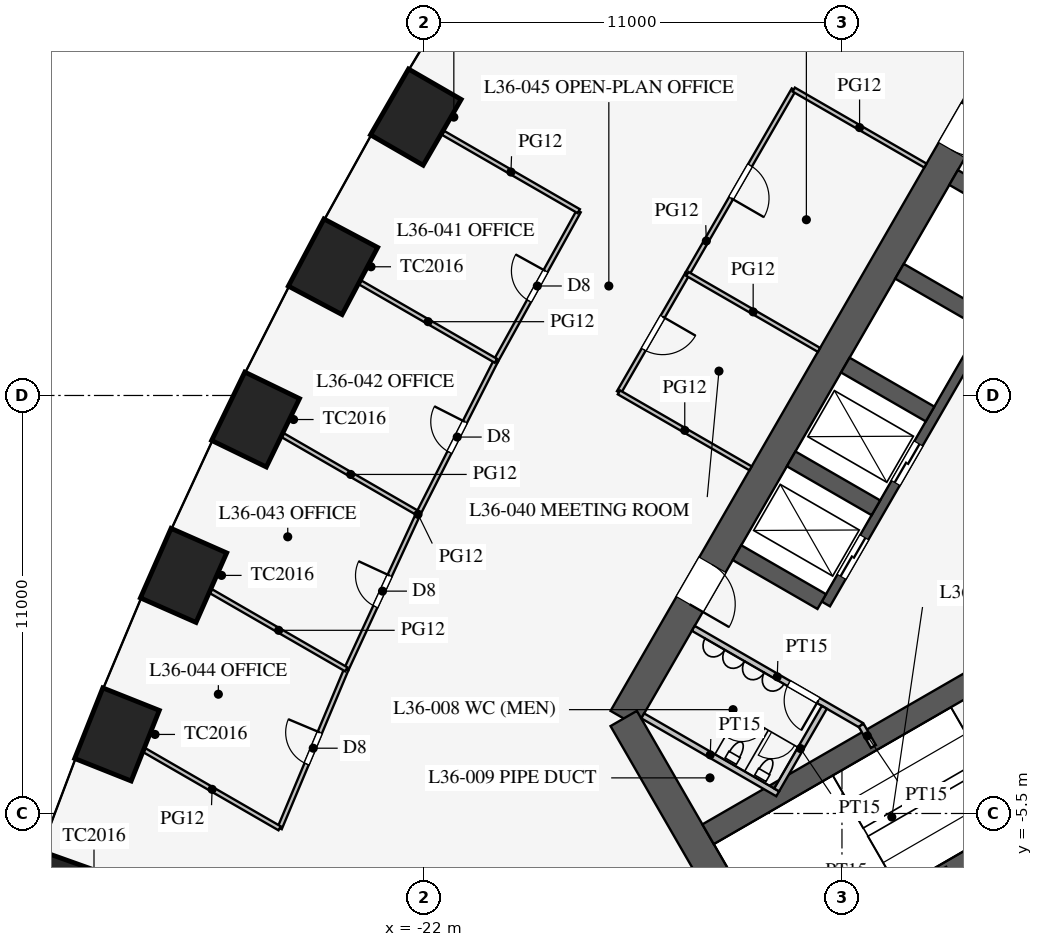
"""IFC4 building model, lengths in metres.
Left out: names, types, materials, properties, quantities, classifications, styles, units other than length and angle.
Written with IfcOpenShell. Run it as: python <this file> out.ifc"""

import sys

from ifc_helpers import new_model, si_unit, direction, frame, frame_2d, origin, origin_2d, place, context, subcontext, project, spatial, rectangle, extrude, element, fill, save


model = new_model("IFC4")
c1 = context("Model", 3, precision=1e-05, world=origin(), true_north=direction((0.0, 1.0)))
c2 = subcontext(c1, "Body", "Model", "MODEL_VIEW")
j1 = project(units=[si_unit("LENGTHUNIT", "METRE"), si_unit("PLANEANGLEUNIT", "RADIAN")], contexts=[c1])
p1 = place(None, origin())
s1 = spatial("IfcSite", under=j1, at=p1, CompositionType="ELEMENT")
p2 = place(p1, origin())
s2 = spatial("IfcBuilding", under=s1, at=p2, CompositionType="ELEMENT")
p3 = place(p2, frame((0.0, 0.0, 157.7)))
s3 = spatial("IfcBuildingStorey", under=s2, at=p3, CompositionType="ELEMENT", Elevation=157.7)
for number, where, z_axis, x_axis in (
    (1, (-22.213, 12.825, 0.0), (0.0, 0.0, 1.0), (-0.5, -0.866, 0.0)),
    (2, (-24.393, 8.887, 0.0), (0.0, 0.0, 1.0), (-0.468, -0.883, 0.0)),
    (3, (-26.43, 4.867, 0.0), (0.0, 0.0, 1.0), (-0.436, -0.9, 0.0)),
    (4, (-28.325, 0.765, 0.0), (0.0, 0.0, 1.0), (-0.403, -0.915, 0.0)),
    (5, (-30.077, -3.42, 0.0), (0.0, 0.0, 1.0), (-0.37, -0.929, 0.0)),
    (6, (-31.682, -7.689, 0.0), (0.0, 0.0, 1.0), (-0.336, -0.942, 0.0)),
):
    element("IfcColumn", number, at=place(p3, frame(where, z_axis=z_axis, x_axis=x_axis)), inside=s3, PredefinedType="COLUMN", context=c2, shape_type="SweptSolid", body=[
        extrude(rectangle(XDim=2.0, YDim=1.6, at=origin_2d()), origin(), (0.0, 0.0, 1.0), 4.2),
    ])
p4 = place(p3, frame((-5.773, 16.0, 0.0), z_axis=(0.0, 0.0, 1.0), x_axis=(-0.500002442456, -0.866023993627, 0.0)))
e7 = element("IfcWall", 7, at=p4, inside=s3, PredefinedType="SHEAR", context=c2, shape_type="SweptSolid", body=[
    extrude(rectangle(XDim=21.939, YDim=0.8, at=frame_2d((10.97, 0.0))), origin(), (0.0, 0.0, 1.0), 4.2),
])
p5 = place(p4, frame((17.27, 0.0, 0.0)))
e8 = element("IfcOpeningElement", 8, at=p5, cuts=e7, PredefinedType="OPENING", context=c2, shape_type="SweptSolid", body=[
    extrude(rectangle(XDim=1.2, YDim=2.1, at=frame_2d((0.6, 1.05))), frame((0.0, 0.41, 0.0), z_axis=(0.0, -1.0, 0.0), x_axis=(1.0, 0.0, 0.0)), (0.0, 0.0, 1.0), 0.82),
])
p6 = place(p4, frame((3.47, 0.0, 0.0)))
e9 = element("IfcOpeningElement", 9, at=p6, cuts=e7, PredefinedType="OPENING", context=c2, shape_type="SweptSolid", body=[
    extrude(rectangle(XDim=1.2, YDim=2.1, at=frame_2d((0.6, 1.05))), frame((0.0, 0.41, 0.0), z_axis=(0.0, -1.0, 0.0), x_axis=(1.0, 0.0, 0.0)), (0.0, 0.0, 1.0), 0.82),
])
p7 = place(p3, frame((-16.743, -3.0, 0.0), z_axis=(0.0, 0.0, 1.0), x_axis=(0.499995765644, -0.866027848477, 0.0)))
e10 = element("IfcWall", 10, at=p7, inside=s3, PredefinedType="SHEAR", context=c2, shape_type="SweptSolid", body=[
    extrude(rectangle(XDim=11.547, YDim=0.8, at=frame_2d((5.773, 0.0))), origin(), (0.0, 0.0, 1.0), 4.2),
])
p8 = place(p3, frame((-5.724, 9.886, 0.0), z_axis=(0.0, 0.0, 1.0), x_axis=(-0.500001763848, -0.866024385424, 0.0)))
e11 = element("IfcWall", 11, at=p8, inside=s3, PredefinedType="SHEAR", context=c2, shape_type="SweptSolid", body=[
    extrude(rectangle(XDim=11.4, YDim=0.25, at=frame_2d((5.7, 0.0))), origin(), (0.0, 0.0, 1.0), 4.2),
])
p9 = place(p8, frame((6.525, 0.0, 0.0)))
e12 = element("IfcOpeningElement", 12, at=p9, cuts=e11, PredefinedType="OPENING", context=c2, shape_type="SweptSolid", body=[
    extrude(rectangle(XDim=1.2, YDim=2.2, at=frame_2d((0.6, 1.1))), frame((0.0, 0.135, 0.0), z_axis=(0.0, -1.0, 0.0), x_axis=(1.0, 0.0, 0.0)), (0.0, 0.0, 1.0), 0.27),
])
p10 = place(p8, frame((9.375, 0.0, 0.0)))
e13 = element("IfcOpeningElement", 13, at=p10, cuts=e11, PredefinedType="OPENING", context=c2, shape_type="SweptSolid", body=[
    extrude(rectangle(XDim=1.2, YDim=2.2, at=frame_2d((0.6, 1.1))), frame((0.0, 0.135, 0.0), z_axis=(0.0, -1.0, 0.0), x_axis=(1.0, 0.0, 0.0)), (0.0, 0.0, 1.0), 0.27),
])
p11 = place(p3, frame((-5.832, 9.949, 0.0), z_axis=(0.0, 0.0, 1.0), x_axis=(-0.866029291668, 0.499993265928, 0.0)))
e14 = element("IfcWall", 14, at=p11, inside=s3, PredefinedType="SHEAR", context=c2, shape_type="SweptSolid", body=[
    extrude(rectangle(XDim=2.575, YDim=0.45, at=frame_2d((1.288, 0.0))), origin(), (0.0, 0.0, 1.0), 4.2),
])
for number, where, z_axis, x_axis in (
    (15, (-7.257, 7.481, 0.0), (0.0, 0.0, 1.0), (-0.866, 0.5, 0.0)),
    (16, (-8.682, 5.012, 0.0), (0.0, 0.0, 1.0), (-0.866, 0.5, 0.0)),
    (17, (-10.107, 2.544, 0.0), (0.0, 0.0, 1.0), (-0.866, 0.5, 0.0)),
    (18, (-11.532, 0.076, 0.0), (0.0, 0.0, 1.0), (-0.866, 0.5, 0.0)),
):
    element("IfcWall", number, at=place(p3, frame(where, z_axis=z_axis, x_axis=x_axis)), inside=s3, PredefinedType="SHEAR", context=c2, shape_type="SweptSolid", body=[
        extrude(rectangle(XDim=2.575, YDim=0.45, at=frame_2d((1.288, 0.0))), origin(), (0.0, 0.0, 1.0), 4.2),
    ])
for number, where, z_axis, x_axis in (
    (19, (-6.663, -1.509, 0.0), (0.0, 0.0, 1.0), (-0.866, -0.5, 0.0)),
    (20, (-4.638, -5.016, 0.0), (0.0, 0.0, 1.0), (-0.866, -0.5, 0.0)),
):
    element("IfcWall", number, at=place(p3, frame(where, z_axis=z_axis, x_axis=x_axis)), inside=s3, PredefinedType="SHEAR", context=c2, shape_type="SweptSolid", body=[
        extrude(rectangle(XDim=9.075, YDim=0.6, at=frame_2d((4.538, 0.0))), origin(), (0.0, 0.0, 1.0), 4.2),
    ])
p12 = place(p3, frame((-10.495, -3.178, 0.0), z_axis=(0.0, 0.0, 1.0), x_axis=(-0.86602216432, 0.500005610874, 0.0)))
e21 = element("IfcWall", 21, at=p12, inside=s3, PredefinedType="PARTITIONING", context=c2, shape_type="SweptSolid", body=[
    extrude(rectangle(XDim=5.1, YDim=0.15, at=frame_2d((2.55, 0.0))), origin(), (0.0, 0.0, 1.0), 4.0),
])
p13 = place(p12, frame((1.3, 0.0, 0.0)))
e22 = element("IfcOpeningElement", 22, at=p13, cuts=e21, PredefinedType="OPENING", context=c2, shape_type="SweptSolid", body=[
    extrude(rectangle(XDim=0.9, YDim=2.1, at=frame_2d((0.45, 1.05))), frame((0.0, 0.085, 0.0), z_axis=(0.0, -1.0, 0.0), x_axis=(1.0, 0.0, 0.0)), (0.0, 0.0, 1.0), 0.17),
])
p14 = place(p3, frame((-10.495, -3.178, 0.0), z_axis=(0.0, 0.0, 1.0), x_axis=(0.499842556608, -0.866116284689, 0.0)))
e23 = element("IfcWall", 23, at=p14, inside=s3, PredefinedType="PARTITIONING", context=c2, shape_type="SweptSolid", body=[
    extrude(rectangle(XDim=0.645, YDim=0.15, at=frame_2d((0.323, 0.0))), origin(), (0.0, 0.0, 1.0), 4.0),
])
p15 = place(p3, frame((-12.691, -4.982, 0.0), z_axis=(0.0, 0.0, 1.0), x_axis=(-0.8660249478, 0.500000789788, 0.0)))
e24 = element("IfcWall", 24, at=p15, inside=s3, PredefinedType="PARTITIONING", context=c2, shape_type="SweptSolid", body=[
    extrude(rectangle(XDim=4.1, YDim=0.15, at=frame_2d((2.05, 0.0))), origin(), (0.0, 0.0, 1.0), 4.0),
])
p16 = place(p3, frame((-11.464, -2.706, 0.0), z_axis=(0.0, 0.0, 1.0), x_axis=(-0.50001992892, -0.866013897511, 0.0)))
e25 = element("IfcWall", 25, at=p16, inside=s3, PredefinedType="PARTITIONING", context=c2, shape_type="SweptSolid", body=[
    extrude(rectangle(XDim=2.51, YDim=0.15, at=frame_2d((1.255, 0.0))), origin(), (0.0, 0.0, 1.0), 4.0),
])
p17 = place(p3, frame((-15.069, 8.7, 0.0), z_axis=(0.0, 0.0, 1.0), x_axis=(-0.500012057535, -0.866018442252, 0.0)))
e26 = element("IfcWall", 26, at=p17, inside=s3, PredefinedType="PARTITIONING", context=c2, shape_type="SweptSolid", body=[
    extrude(rectangle(XDim=3.6, YDim=0.12, at=frame_2d((1.8, 0.0))), origin(), (0.0, 0.0, 1.0), 2.9),
])
p18 = place(p17, frame((1.3, 0.0, 0.15)))
e27 = element("IfcOpeningElement", 27, at=p18, cuts=e26, PredefinedType="OPENING", context=c2, shape_type="SweptSolid", body=[
    extrude(rectangle(XDim=1.0, YDim=2.1, at=frame_2d((0.5, 1.05))), frame((0.0, 0.07, 0.0), z_axis=(0.0, -1.0, 0.0), x_axis=(1.0, 0.0, 0.0)), (0.0, 0.0, 1.0), 0.14),
])
p19 = place(p3, frame((-12.269, 13.55, 0.0), z_axis=(0.0, 0.0, 1.0), x_axis=(-0.49999793692, -0.866026594901, 0.0)))
e28 = element("IfcWall", 28, at=p19, inside=s3, PredefinedType="PARTITIONING", context=c2, shape_type="SweptSolid", body=[
    extrude(rectangle(XDim=5.6, YDim=0.12, at=frame_2d((2.8, 0.0))), origin(), (0.0, 0.0, 1.0), 2.9),
])
p20 = place(p19, frame((2.3, 0.0, 0.15)))
e29 = element("IfcOpeningElement", 29, at=p20, cuts=e28, PredefinedType="OPENING", context=c2, shape_type="SweptSolid", body=[
    extrude(rectangle(XDim=1.0, YDim=2.1, at=frame_2d((0.5, 1.05))), frame((0.0, 0.07, 0.0), z_axis=(0.0, -1.0, 0.0), x_axis=(1.0, 0.0, 0.0)), (0.0, 0.0, 1.0), 0.14),
])
p21 = place(p3, frame((-13.405, 3.582, 0.0), z_axis=(0.0, 0.0, 1.0), x_axis=(-0.866026010844, 0.49999894854, 0.0)))
e30 = element("IfcWall", 30, at=p21, inside=s3, PredefinedType="PARTITIONING", context=c2, shape_type="SweptSolid", body=[
    extrude(rectangle(XDim=4.0, YDim=0.12, at=frame_2d((2.0, 0.0))), origin(), (0.0, 0.0, 1.0), 2.9),
])
p22 = place(p3, frame((-11.605, 6.7, 0.0), z_axis=(0.0, 0.0, 1.0), x_axis=(-0.866026010844, 0.49999894854, 0.0)))
e31 = element("IfcWall", 31, at=p22, inside=s3, PredefinedType="PARTITIONING", context=c2, shape_type="SweptSolid", body=[
    extrude(rectangle(XDim=4.0, YDim=0.12, at=frame_2d((2.0, 0.0))), origin(), (0.0, 0.0, 1.0), 2.8),
])
p23 = place(p3, frame((-8.805, 11.55, 0.0), z_axis=(0.0, 0.0, 1.0), x_axis=(-0.866026010844, 0.49999894854, 0.0)))
e32 = element("IfcWall", 32, at=p23, inside=s3, PredefinedType="PARTITIONING", context=c2, shape_type="SweptSolid", body=[
    extrude(rectangle(XDim=4.0, YDim=0.12, at=frame_2d((2.0, 0.0))), origin(), (0.0, 0.0, 1.0), 2.9),
])
p24 = place(p3, frame((-17.927, 10.35, 0.0), z_axis=(0.0, 0.0, 1.0), x_axis=(-0.484292898211, -0.874905931368, 0.0)))
e33 = element("IfcWall", 33, at=p24, inside=s3, PredefinedType="PARTITIONING", context=c2, shape_type="SweptSolid", body=[
    extrude(rectangle(XDim=4.501, YDim=0.12, at=frame_2d((2.25, 0.0))), origin(), (0.0, 0.0, 1.0), 2.9),
])
p25 = place(p24, frame((1.8, 0.0, 0.15)))
e34 = element("IfcOpeningElement", 34, at=p25, cuts=e33, PredefinedType="OPENING", context=c2, shape_type="SweptSolid", body=[
    extrude(rectangle(XDim=0.9, YDim=2.1, at=frame_2d((0.45, 1.05))), frame((0.0, 0.07, 0.0), z_axis=(0.0, -1.0, 0.0), x_axis=(1.0, 0.0, 0.0)), (0.0, 0.0, 1.0), 0.14),
])
p26 = place(p3, frame((-24.043, -1.708, 0.0), z_axis=(0.0, 0.0, 1.0), x_axis=(-0.386762112496, -0.922179520667, 0.0)))
e35 = element("IfcWall", 35, at=p26, inside=s3, PredefinedType="PARTITIONING", context=c2, shape_type="SweptSolid", body=[
    extrude(rectangle(XDim=4.536, YDim=0.12, at=frame_2d((2.268, 0.0))), origin(), (0.0, 0.0, 1.0), 2.9),
])
p27 = place(p26, frame((1.8, 0.0, 0.15)))
e36 = element("IfcOpeningElement", 36, at=p27, cuts=e35, PredefinedType="OPENING", context=c2, shape_type="SweptSolid", body=[
    extrude(rectangle(XDim=0.9, YDim=2.1, at=frame_2d((0.45, 1.05))), frame((0.0, 0.07, 0.0), z_axis=(0.0, -1.0, 0.0), x_axis=(1.0, 0.0, 0.0)), (0.0, 0.0, 1.0), 0.14),
])
p28 = place(p3, frame((-20.106, 6.412, 0.0), z_axis=(0.0, 0.0, 1.0), x_axis=(-0.452471679136, -0.891778772779, 0.0)))
e37 = element("IfcWall", 37, at=p28, inside=s3, PredefinedType="PARTITIONING", context=c2, shape_type="SweptSolid", body=[
    extrude(rectangle(XDim=4.507, YDim=0.12, at=frame_2d((2.253, 0.0))), origin(), (0.0, 0.0, 1.0), 2.9),
])
p29 = place(p28, frame((1.8, 0.0, 0.15)))
e38 = element("IfcOpeningElement", 38, at=p29, cuts=e37, PredefinedType="OPENING", context=c2, shape_type="SweptSolid", body=[
    extrude(rectangle(XDim=0.9, YDim=2.1, at=frame_2d((0.45, 1.05))), frame((0.0, 0.07, 0.0), z_axis=(0.0, -1.0, 0.0), x_axis=(1.0, 0.0, 0.0)), (0.0, 0.0, 1.0), 0.14),
])
p30 = place(p3, frame((-22.145, 2.393, 0.0), z_axis=(0.0, 0.0, 1.0), x_axis=(-0.41992827805, -0.90755729367, 0.0)))
e39 = element("IfcWall", 39, at=p30, inside=s3, PredefinedType="PARTITIONING", context=c2, shape_type="SweptSolid", body=[
    extrude(rectangle(XDim=4.519, YDim=0.12, at=frame_2d((2.259, 0.0))), origin(), (0.0, 0.0, 1.0), 2.9),
])
p31 = place(p30, frame((1.8, 0.0, 0.15)))
e40 = element("IfcOpeningElement", 40, at=p31, cuts=e39, PredefinedType="OPENING", context=c2, shape_type="SweptSolid", body=[
    extrude(rectangle(XDim=0.9, YDim=2.1, at=frame_2d((0.45, 1.05))), frame((0.0, 0.07, 0.0), z_axis=(0.0, -1.0, 0.0), x_axis=(1.0, 0.0, 0.0)), (0.0, 0.0, 1.0), 0.14),
])
p32 = place(p3, frame((-17.927, 10.35, 0.0), z_axis=(0.0, 0.0, 1.0), x_axis=(-0.866009926209, 0.50002680699, 0.0)))
e41 = element("IfcWall", 41, at=p32, inside=s3, PredefinedType="PARTITIONING", context=c2, shape_type="SweptSolid", body=[
    extrude(rectangle(XDim=4.12, YDim=0.12, at=frame_2d((2.06, 0.0))), origin(), (0.0, 0.0, 1.0), 2.8),
])
p33 = place(p3, frame((-24.043, -1.708, 0.0), z_axis=(0.0, 0.0, 1.0), x_axis=(-0.866019409031, 0.500010383074, 0.0)))
e42 = element("IfcWall", 42, at=p33, inside=s3, PredefinedType="PARTITIONING", context=c2, shape_type="SweptSolid", body=[
    extrude(rectangle(XDim=4.11, YDim=0.12, at=frame_2d((2.055, 0.0))), origin(), (0.0, 0.0, 1.0), 2.6),
])
p34 = place(p3, frame((-25.797, -5.891, 0.0), z_axis=(0.0, 0.0, 1.0), x_axis=(-0.866019112135, 0.500010897298, 0.0)))
e43 = element("IfcWall", 43, at=p34, inside=s3, PredefinedType="PARTITIONING", context=c2, shape_type="SweptSolid", body=[
    extrude(rectangle(XDim=4.103, YDim=0.12, at=frame_2d((2.052, 0.0))), origin(), (0.0, 0.0, 1.0), 2.8),
])
p35 = place(p3, frame((-20.106, 6.412, 0.0), z_axis=(0.0, 0.0, 1.0), x_axis=(-0.866016800201, 0.500014901547, 0.0)))
e44 = element("IfcWall", 44, at=p35, inside=s3, PredefinedType="PARTITIONING", context=c2, shape_type="SweptSolid", body=[
    extrude(rectangle(XDim=4.119, YDim=0.12, at=frame_2d((2.06, 0.0))), origin(), (0.0, 0.0, 1.0), 2.8),
])
p36 = place(p3, frame((-22.145, 2.393, 0.0), z_axis=(0.0, 0.0, 1.0), x_axis=(-0.866018637367, 0.500011719595, 0.0)))
e45 = element("IfcWall", 45, at=p36, inside=s3, PredefinedType="PARTITIONING", context=c2, shape_type="SweptSolid", body=[
    extrude(rectangle(XDim=4.116, YDim=0.12, at=frame_2d((2.058, 0.0))), origin(), (0.0, 0.0, 1.0), 2.9),
])
p37 = place(p13, origin())
e46 = element("IfcDoor", 46, at=p37, inside=s3, OperationType="SINGLE_SWING_LEFT", PredefinedType="DOOR", context=c2, shape_type="SweptSolid", body=[
    extrude(rectangle(XDim=0.9, YDim=2.1, at=frame_2d((0.45, 1.05))), frame((0.0, 0.025, 0.0), z_axis=(0.0, -1.0, 0.0), x_axis=(1.0, 0.0, 0.0)), (0.0, 0.0, 1.0), 0.05),
])
fill(e22, e46)
p38 = place(p5, origin())
e47 = element("IfcDoor", 47, at=p38, inside=s3, OperationType="SINGLE_SWING_RIGHT", PredefinedType="DOOR", context=c2, shape_type="SweptSolid", body=[
    extrude(rectangle(XDim=1.2, YDim=2.1, at=frame_2d((0.6, 1.05))), frame((0.0, 0.025, 0.0), z_axis=(0.0, -1.0, 0.0), x_axis=(1.0, 0.0, 0.0)), (0.0, 0.0, 1.0), 0.05),
])
fill(e8, e47)
p39 = place(p6, origin())
e48 = element("IfcDoor", 48, at=p39, inside=s3, OperationType="SINGLE_SWING_LEFT", PredefinedType="DOOR", context=c2, shape_type="SweptSolid", body=[
    extrude(rectangle(XDim=1.2, YDim=2.1, at=frame_2d((0.6, 1.05))), frame((0.0, 0.025, 0.0), z_axis=(0.0, -1.0, 0.0), x_axis=(1.0, 0.0, 0.0)), (0.0, 0.0, 1.0), 0.05),
])
fill(e9, e48)
p40 = place(p20, origin())
e49 = element("IfcDoor", 49, at=p40, inside=s3, OperationType="SINGLE_SWING_RIGHT", PredefinedType="DOOR", context=c2, shape_type="SweptSolid", body=[
    extrude(rectangle(XDim=1.0, YDim=2.1, at=frame_2d((0.5, 1.05))), frame((0.0, 0.025, 0.0), z_axis=(0.0, -1.0, 0.0), x_axis=(1.0, 0.0, 0.0)), (0.0, 0.0, 1.0), 0.05),
])
fill(e29, e49)
p41 = place(p18, origin())
e50 = element("IfcDoor", 50, at=p41, inside=s3, OperationType="SINGLE_SWING_LEFT", PredefinedType="DOOR", context=c2, shape_type="SweptSolid", body=[
    extrude(rectangle(XDim=1.0, YDim=2.1, at=frame_2d((0.5, 1.05))), frame((0.0, 0.025, 0.0), z_axis=(0.0, -1.0, 0.0), x_axis=(1.0, 0.0, 0.0)), (0.0, 0.0, 1.0), 0.05),
])
fill(e27, e50)
p42 = place(p25, frame((0.9, 0.0, 0.0), z_axis=(0.0, 0.0, 1.0), x_axis=(-1.0, 0.0, 0.0)))
e51 = element("IfcDoor", 51, at=p42, inside=s3, OperationType="SINGLE_SWING_RIGHT", PredefinedType="DOOR", context=c2, shape_type="SweptSolid", body=[
    extrude(rectangle(XDim=0.9, YDim=2.1, at=frame_2d((0.45, 1.05))), frame((0.0, 0.025, 0.0), z_axis=(0.0, -1.0, 0.0), x_axis=(1.0, 0.0, 0.0)), (0.0, 0.0, 1.0), 0.05),
])
fill(e34, e51)
p43 = place(p29, frame((0.9, 0.0, 0.0), z_axis=(0.0, 0.0, 1.0), x_axis=(-1.0, 0.0, 0.0)))
e52 = element("IfcDoor", 52, at=p43, inside=s3, OperationType="SINGLE_SWING_RIGHT", PredefinedType="DOOR", context=c2, shape_type="SweptSolid", body=[
    extrude(rectangle(XDim=0.9, YDim=2.1, at=frame_2d((0.45, 1.05))), frame((0.0, 0.025, 0.0), z_axis=(0.0, -1.0, 0.0), x_axis=(1.0, 0.0, 0.0)), (0.0, 0.0, 1.0), 0.05),
])
fill(e38, e52)
p44 = place(p31, frame((0.9, 0.0, 0.0), z_axis=(0.0, 0.0, 1.0), x_axis=(-1.0, 0.0, 0.0)))
e53 = element("IfcDoor", 53, at=p44, inside=s3, OperationType="SINGLE_SWING_RIGHT", PredefinedType="DOOR", context=c2, shape_type="SweptSolid", body=[
    extrude(rectangle(XDim=0.9, YDim=2.1, at=frame_2d((0.45, 1.05))), frame((0.0, 0.025, 0.0), z_axis=(0.0, -1.0, 0.0), x_axis=(1.0, 0.0, 0.0)), (0.0, 0.0, 1.0), 0.05),
])
fill(e40, e53)
p45 = place(p27, frame((0.9, 0.0, 0.0), z_axis=(0.0, 0.0, 1.0), x_axis=(-1.0, 0.0, 0.0)))
e54 = element("IfcDoor", 54, at=p45, inside=s3, OperationType="SINGLE_SWING_RIGHT", PredefinedType="DOOR", context=c2, shape_type="SweptSolid", body=[
    extrude(rectangle(XDim=0.9, YDim=2.1, at=frame_2d((0.45, 1.05))), frame((0.0, 0.025, 0.0), z_axis=(0.0, -1.0, 0.0), x_axis=(1.0, 0.0, 0.0)), (0.0, 0.0, 1.0), 0.05),
])
fill(e36, e54)
p46 = place(p9, origin())
e55 = element("IfcDoor", 55, at=p46, inside=s3, OperationType="DOUBLE_DOOR_SLIDING", PredefinedType="DOOR", context=c2, shape_type="SweptSolid", body=[
    extrude(rectangle(XDim=1.2, YDim=2.2, at=frame_2d((0.6, 1.1))), frame((0.0, 0.025, 0.0), z_axis=(0.0, -1.0, 0.0), x_axis=(1.0, 0.0, 0.0)), (0.0, 0.0, 1.0), 0.05),
])
fill(e12, e55)
p47 = place(p10, origin())
e56 = element("IfcDoor", 56, at=p47, inside=s3, OperationType="DOUBLE_DOOR_SLIDING", PredefinedType="DOOR", context=c2, shape_type="SweptSolid", body=[
    extrude(rectangle(XDim=1.2, YDim=2.2, at=frame_2d((0.6, 1.1))), frame((0.0, 0.025, 0.0), z_axis=(0.0, -1.0, 0.0), x_axis=(1.0, 0.0, 0.0)), (0.0, 0.0, 1.0), 0.05),
])
fill(e13, e56)
save(model, sys.argv[1])
